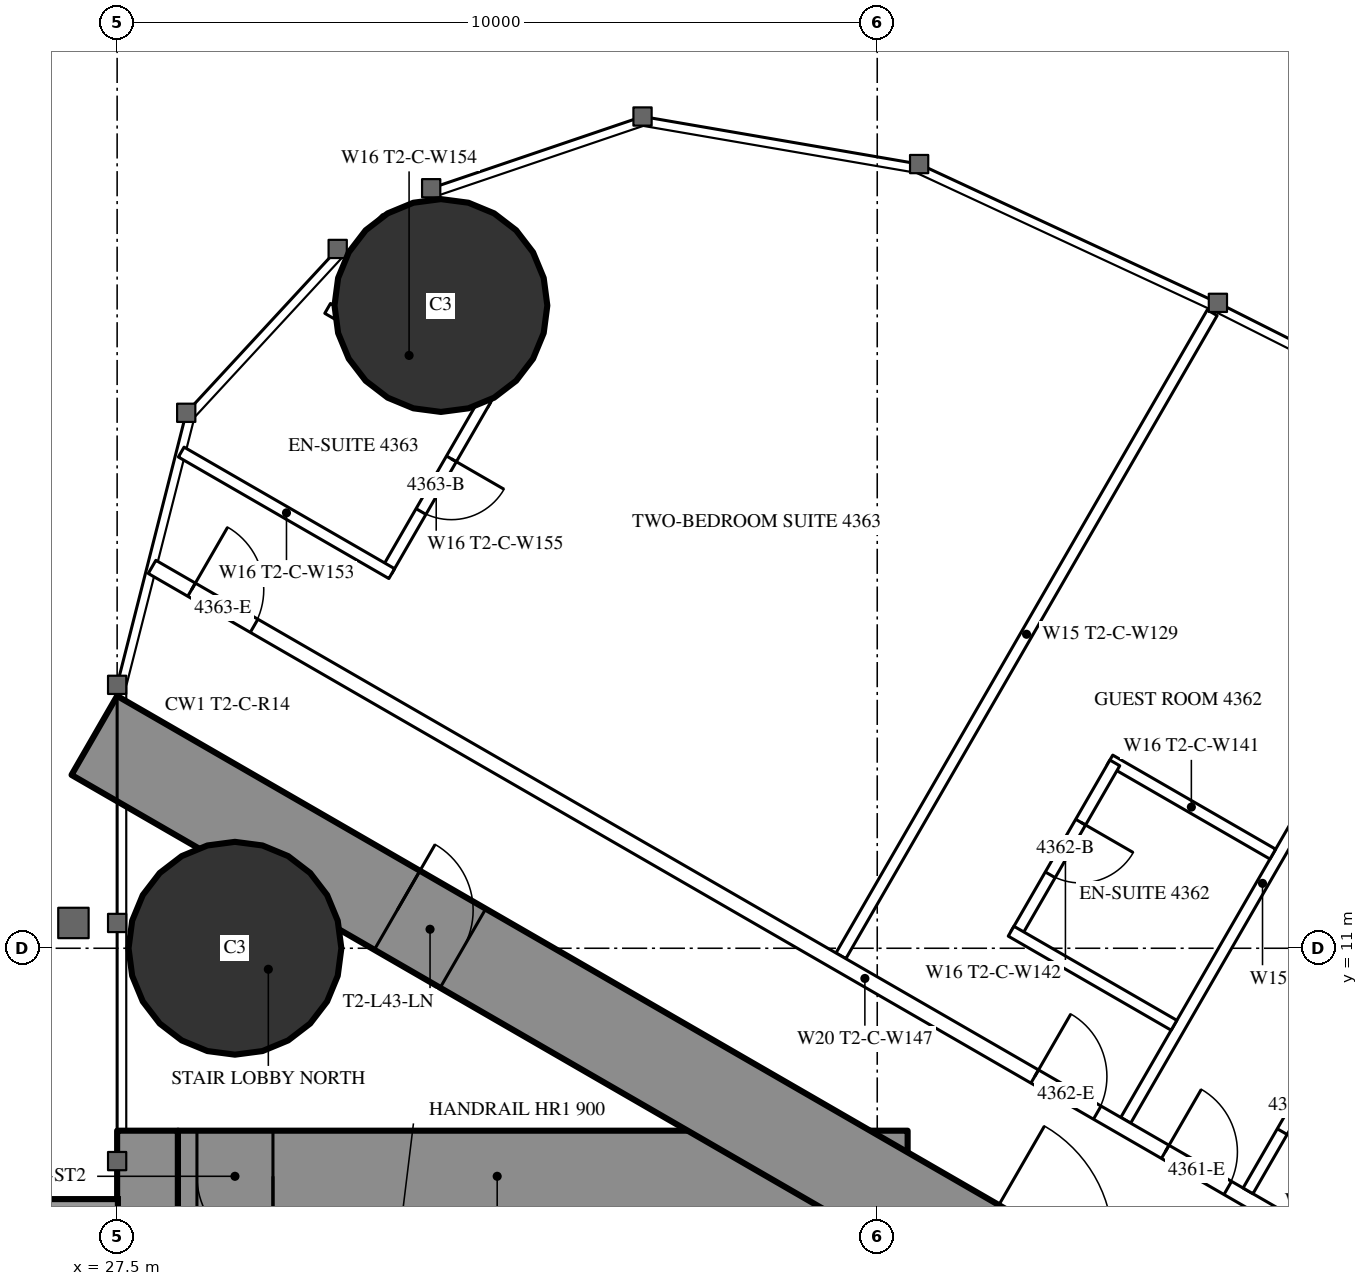
"""IFC4 building model, lengths in metres.
Left out: names, types, materials, properties, quantities, classifications, styles, units other than length and angle.
Written with IfcOpenShell. Run it as: python <this file> out.ifc"""

import sys

from ifc_helpers import new_model, si_unit, direction, frame, frame_2d, origin, origin_2d, place, context, subcontext, project, spatial, rectangle, circle, extrude, element, fill, save


model = new_model("IFC4")
c1 = context("Model", 3, precision=1e-05, world=origin(), true_north=direction((0.0, 1.0)))
c2 = subcontext(c1, "Body", "Model", "MODEL_VIEW")
j1 = project(units=[si_unit("LENGTHUNIT", "METRE"), si_unit("PLANEANGLEUNIT", "RADIAN")], contexts=[c1])
p1 = place(None, origin())
s1 = spatial("IfcSite", under=j1, at=p1, CompositionType="ELEMENT")
p2 = place(p1, origin())
s2 = spatial("IfcBuilding", under=s1, at=p2, CompositionType="ELEMENT")
p3 = place(p2, frame((0.0, 0.0, 163.3)))
s3 = spatial("IfcBuildingStorey", under=s2, at=p3, CompositionType="ELEMENT", Elevation=163.3)
for number, where, z_axis, x_axis in (
    (1, (31.76, 19.456, 0.0), (0.0, 0.0, 1.0), (1.0, 0.0, 0.0)),
    (2, (29.05, 11.0, 0.0), (0.0, 0.0, 1.0), (1.0, 0.0, 0.0)),
):
    element("IfcColumn", number, at=place(p3, frame(where, z_axis=z_axis, x_axis=x_axis)), inside=s3, PredefinedType="COLUMN", context=c2, shape_type="SweptSolid", body=[
        extrude(circle(Radius=1.4, at=origin_2d()), origin(), (0.0, 0.0, 1.0), 3.5),
    ])
p4 = place(p3, frame((27.9, -8.6, 0.0), z_axis=(0.0, 0.0, 1.0), x_axis=(0.0, 1.0, 0.0)))
e3 = element("IfcWall", 3, at=p4, inside=s3, PredefinedType="SHEAR", context=c2, shape_type="SweptSolid", body=[
    extrude(rectangle(XDim=17.2, YDim=0.8, at=frame_2d((8.6, 0.0))), origin(), (0.0, 0.0, 1.0), 3.5),
])
p5 = place(p4, frame((2.45, 0.0, 0.6)))
e4 = element("IfcOpeningElement", 4, at=p5, cuts=e3, PredefinedType="OPENING", context=c2, shape_type="SweptSolid", body=[
    extrude(rectangle(XDim=0.6, YDim=2.1, at=frame_2d((0.3, 1.05))), frame((0.0, 0.41, 0.0), z_axis=(0.0, -1.0, 0.0), x_axis=(1.0, 0.0, 0.0)), (0.0, 0.0, 1.0), 0.82),
])
p6 = place(p4, frame((14.15, 0.0, 0.6)))
e5 = element("IfcOpeningElement", 5, at=p6, cuts=e3, PredefinedType="OPENING", context=c2, shape_type="SweptSolid", body=[
    extrude(rectangle(XDim=0.6, YDim=2.1, at=frame_2d((0.3, 1.05))), frame((0.0, 0.41, 0.0), z_axis=(0.0, -1.0, 0.0), x_axis=(1.0, 0.0, 0.0)), (0.0, 0.0, 1.0), 0.82),
])
p7 = place(p3, frame((37.3, -8.6, 0.0), z_axis=(0.0, 0.0, 1.0), x_axis=(0.0, 1.0, 0.0)))
e6 = element("IfcWall", 6, at=p7, inside=s3, PredefinedType="SHEAR", context=c2, shape_type="SweptSolid", body=[
    extrude(rectangle(XDim=17.2, YDim=1.2, at=frame_2d((8.6, 0.0))), origin(), (0.0, 0.0, 1.0), 3.5),
])
p8 = place(p7, frame((7.7, 0.0, 0.0)))
e7 = element("IfcOpeningElement", 7, at=p8, cuts=e6, PredefinedType="OPENING", context=c2, shape_type="SweptSolid", body=[
    extrude(rectangle(XDim=1.8, YDim=2.2, at=frame_2d((0.9, 1.1))), frame((0.0, 0.61, 0.0), z_axis=(0.0, -1.0, 0.0), x_axis=(1.0, 0.0, 0.0)), (0.0, 0.0, 1.0), 1.22),
])
p9 = place(p3, frame((28.3, 8.0, 0.0), z_axis=(0.0, 0.0, 1.0), x_axis=(1.0, 0.0, 0.0)))
e8 = element("IfcWall", 8, at=p9, inside=s3, PredefinedType="SHEAR", context=c2, shape_type="SweptSolid", body=[
    extrude(rectangle(XDim=8.4, YDim=1.2, at=frame_2d((4.2, 0.0))), origin(), (0.0, 0.0, 1.0), 3.5),
])
p10 = place(p9, frame((0.25, 0.0, 0.0)))
e9 = element("IfcOpeningElement", 9, at=p10, cuts=e8, PredefinedType="OPENING", context=c2, shape_type="SweptSolid", body=[
    extrude(rectangle(XDim=1.0, YDim=2.2, at=frame_2d((0.5, 1.1))), frame((0.0, 0.61, 0.0), z_axis=(0.0, -1.0, 0.0), x_axis=(1.0, 0.0, 0.0)), (0.0, 0.0, 1.0), 1.22),
])
p11 = place(p3, frame((27.2, 13.8, 0.0), z_axis=(0.0, 0.0, 1.0), x_axis=(0.866024515034, -0.500001539357, 0.0)))
e10 = element("IfcWall", 10, at=p11, inside=s3, PredefinedType="SHEAR", context=c2, shape_type="SweptSolid", body=[
    extrude(rectangle(XDim=26.907, YDim=1.2, at=frame_2d((13.454, 0.0))), origin(), (0.0, 0.0, 1.0), 3.5),
])
p12 = place(p11, frame((4.6, 0.0, 0.0)))
e11 = element("IfcOpeningElement", 11, at=p12, cuts=e10, PredefinedType="OPENING", context=c2, shape_type="SweptSolid", body=[
    extrude(rectangle(XDim=1.0, YDim=2.2, at=frame_2d((0.5, 1.1))), frame((0.0, 0.61, 0.0), z_axis=(0.0, -1.0, 0.0), x_axis=(1.0, 0.0, 0.0)), (0.0, 0.0, 1.0), 1.22),
])
p13 = place(p11, frame((13.395, 0.0, 0.0)))
e12 = element("IfcOpeningElement", 12, at=p13, cuts=e10, PredefinedType="OPENING", context=c2, shape_type="SweptSolid", body=[
    extrude(rectangle(XDim=1.8, YDim=2.2, at=frame_2d((0.9, 1.1))), frame((0.0, 0.61, 0.0), z_axis=(0.0, -1.0, 0.0), x_axis=(1.0, 0.0, 0.0)), (0.0, 0.0, 1.0), 1.22),
])
p14 = place(p3, frame((37.022, 10.9, 0.0), z_axis=(0.0, 0.0, 1.0), x_axis=(0.499998620953, 0.866026199976, 0.0)))
e13 = element("IfcWall", 13, at=p14, inside=s3, PredefinedType="PARTITIONING", context=c2, shape_type="SweptSolid", body=[
    extrude(rectangle(XDim=9.77, YDim=0.15, at=frame_2d((4.885, 0.0))), origin(), (0.0, 0.0, 1.0), 3.25),
])
p15 = place(p3, frame((40.769, 8.737, 0.0), z_axis=(0.0, 0.0, 1.0), x_axis=(0.500013115284, 0.866017831539, 0.0)))
e14 = element("IfcWall", 14, at=p15, inside=s3, PredefinedType="PARTITIONING", context=c2, shape_type="SweptSolid", body=[
    extrude(rectangle(XDim=7.198, YDim=0.15, at=frame_2d((3.599, 0.0))), origin(), (0.0, 0.0, 1.0), 2.3),
])
p16 = place(p3, frame((27.959, 16.017, 0.0), z_axis=(0.0, 0.0, 1.0), x_axis=(0.866027146794, -0.499996981007, 0.0)))
e15 = element("IfcWall", 15, at=p16, inside=s3, PredefinedType="PARTITIONING", context=c2, shape_type="SweptSolid", body=[
    extrude(rectangle(XDim=21.657, YDim=0.2, at=frame_2d((10.829, 0.0))), origin(), (0.0, 0.0, 1.0), 3.25),
])
p17 = place(p16, frame((15.391, 0.0, 0.0)))
e16 = element("IfcOpeningElement", 16, at=p17, cuts=e15, PredefinedType="OPENING", context=c2, shape_type="SweptSolid", body=[
    extrude(rectangle(XDim=0.95, YDim=2.2, at=frame_2d((0.475, 1.1))), frame((0.0, 0.11, 0.0), z_axis=(0.0, -1.0, 0.0), x_axis=(1.0, 0.0, 0.0)), (0.0, 0.0, 1.0), 0.22),
])
p18 = place(p16, frame((13.409, 0.0, 0.0)))
e17 = element("IfcOpeningElement", 17, at=p18, cuts=e15, PredefinedType="OPENING", context=c2, shape_type="SweptSolid", body=[
    extrude(rectangle(XDim=0.95, YDim=2.2, at=frame_2d((0.475, 1.1))), frame((0.0, 0.11, 0.0), z_axis=(0.0, -1.0, 0.0), x_axis=(1.0, 0.0, 0.0)), (0.0, 0.0, 1.0), 0.22),
])
p19 = place(p16, frame((0.6, 0.0, 0.0)))
e18 = element("IfcOpeningElement", 18, at=p19, cuts=e15, PredefinedType="OPENING", context=c2, shape_type="SweptSolid", body=[
    extrude(rectangle(XDim=0.95, YDim=2.2, at=frame_2d((0.475, 1.1))), frame((0.0, 0.11, 0.0), z_axis=(0.0, -1.0, 0.0), x_axis=(1.0, 0.0, 0.0)), (0.0, 0.0, 1.0), 0.22),
])
p20 = place(p16, frame((19.349, 0.0, 0.0)))
e19 = element("IfcOpeningElement", 19, at=p20, cuts=e15, PredefinedType="OPENING", context=c2, shape_type="SweptSolid", body=[
    extrude(rectangle(XDim=1.8, YDim=2.2, at=frame_2d((0.9, 1.1))), frame((0.0, 0.11, 0.0), z_axis=(0.0, -1.0, 0.0), x_axis=(1.0, 0.0, 0.0)), (0.0, 0.0, 1.0), 0.22),
])
p21 = place(p3, frame((42.378, 7.808, 0.0), z_axis=(0.0, 0.0, 1.0), x_axis=(0.500006934395, 0.866021400173, 0.0)))
e20 = element("IfcWall", 20, at=p21, inside=s3, PredefinedType="PARTITIONING", context=c2, shape_type="SweptSolid", body=[
    extrude(rectangle(XDim=2.6, YDim=0.15, at=frame_2d((1.3, 0.0))), origin(), (0.0, 0.0, 1.0), 3.25),
])
p22 = place(p21, frame((0.9, 0.0, 0.0)))
e21 = element("IfcOpeningElement", 21, at=p22, cuts=e20, PredefinedType="OPENING", context=c2, shape_type="SweptSolid", body=[
    extrude(rectangle(XDim=0.8, YDim=2.2, at=frame_2d((0.4, 1.1))), frame((0.0, 0.085, 0.0), z_axis=(0.0, -1.0, 0.0), x_axis=(1.0, 0.0, 0.0)), (0.0, 0.0, 1.0), 0.17),
])
p23 = place(p3, frame((40.561, 13.476, 0.0), z_axis=(0.0, 0.0, 1.0), x_axis=(0.866006523861, -0.500032699561, 0.0)))
e22 = element("IfcWall", 22, at=p23, inside=s3, PredefinedType="PARTITIONING", context=c2, shape_type="SweptSolid", body=[
    extrude(rectangle(XDim=2.475, YDim=0.15, at=frame_2d((1.237, 0.0))), origin(), (0.0, 0.0, 1.0), 3.25),
])
p24 = place(p3, frame((39.326, 11.187, 0.0), z_axis=(0.0, 0.0, 1.0), x_axis=(0.500047596559, 0.865997922154, 0.0)))
e23 = element("IfcWall", 23, at=p24, inside=s3, PredefinedType="PARTITIONING", context=c2, shape_type="SweptSolid", body=[
    extrude(rectangle(XDim=2.6, YDim=0.15, at=frame_2d((1.3, 0.0))), origin(), (0.0, 0.0, 1.0), 3.25),
])
p25 = place(p24, frame((0.9, 0.0, 0.0)))
e24 = element("IfcOpeningElement", 24, at=p25, cuts=e23, PredefinedType="OPENING", context=c2, shape_type="SweptSolid", body=[
    extrude(rectangle(XDim=0.8, YDim=2.2, at=frame_2d((0.4, 1.1))), frame((0.0, 0.085, 0.0), z_axis=(0.0, -1.0, 0.0), x_axis=(1.0, 0.0, 0.0)), (0.0, 0.0, 1.0), 0.17),
])
for number, where, z_axis, x_axis in (
    (25, (39.261, 11.224, 0.0), (0.0, 0.0, 1.0), (0.866, -0.5, 0.0)),
    (26, (30.269, 19.418, 0.0), (0.0, 0.0, 1.0), (0.866, -0.5, 0.0)),
):
    element("IfcWall", number, at=place(p3, frame(where, z_axis=z_axis, x_axis=x_axis)), inside=s3, PredefinedType="PARTITIONING", context=c2, shape_type="SweptSolid", body=[
        extrude(rectangle(XDim=2.475, YDim=0.15, at=frame_2d((1.237, 0.0))), origin(), (0.0, 0.0, 1.0), 3.25),
    ])
p26 = place(p3, frame((31.048, 15.966, 0.0), z_axis=(0.0, 0.0, 1.0), x_axis=(0.499936506574, 0.866062058628, 0.0)))
e27 = element("IfcWall", 27, at=p26, inside=s3, PredefinedType="PARTITIONING", context=c2, shape_type="SweptSolid", body=[
    extrude(rectangle(XDim=2.6, YDim=0.15, at=frame_2d((1.3, 0.0))), origin(), (0.0, 0.0, 1.0), 2.3),
])
p27 = place(p26, frame((0.9, 0.0, 0.0)))
e28 = element("IfcOpeningElement", 28, at=p27, cuts=e27, PredefinedType="OPENING", context=c2, shape_type="SweptSolid", body=[
    extrude(rectangle(XDim=0.8, YDim=2.2, at=frame_2d((0.4, 1.1))), frame((0.0, 0.085, 0.0), z_axis=(0.0, -1.0, 0.0), x_axis=(1.0, 0.0, 0.0)), (0.0, 0.0, 1.0), 0.17),
])
p28 = place(p3, frame((28.343, 17.528, 0.0), z_axis=(0.0, 0.0, 1.0), x_axis=(0.86600760081, -0.500030834389, 0.0)))
e29 = element("IfcWall", 29, at=p28, inside=s3, PredefinedType="PARTITIONING", context=c2, shape_type="SweptSolid", body=[
    extrude(rectangle(XDim=3.198, YDim=0.15, at=frame_2d((1.599, 0.0))), origin(), (0.0, 0.0, 1.0), 3.25),
])
p29 = place(p22, origin())
e30 = element("IfcDoor", 30, at=p29, inside=s3, OperationType="SINGLE_SWING_RIGHT", PredefinedType="DOOR", context=c2, shape_type="SweptSolid", body=[
    extrude(rectangle(XDim=0.8, YDim=2.2, at=frame_2d((0.4, 1.1))), frame((0.0, 0.025, 0.0), z_axis=(0.0, -1.0, 0.0), x_axis=(1.0, 0.0, 0.0)), (0.0, 0.0, 1.0), 0.05),
])
fill(e21, e30)
p30 = place(p17, origin())
e31 = element("IfcDoor", 31, at=p30, inside=s3, OperationType="SINGLE_SWING_LEFT", PredefinedType="DOOR", context=c2, shape_type="SweptSolid", body=[
    extrude(rectangle(XDim=0.95, YDim=2.2, at=frame_2d((0.475, 1.1))), frame((0.0, 0.025, 0.0), z_axis=(0.0, -1.0, 0.0), x_axis=(1.0, 0.0, 0.0)), (0.0, 0.0, 1.0), 0.05),
])
fill(e16, e31)
p31 = place(p25, origin())
e32 = element("IfcDoor", 32, at=p31, inside=s3, OperationType="SINGLE_SWING_RIGHT", PredefinedType="DOOR", context=c2, shape_type="SweptSolid", body=[
    extrude(rectangle(XDim=0.8, YDim=2.2, at=frame_2d((0.4, 1.1))), frame((0.0, 0.025, 0.0), z_axis=(0.0, -1.0, 0.0), x_axis=(1.0, 0.0, 0.0)), (0.0, 0.0, 1.0), 0.05),
])
fill(e24, e32)
p32 = place(p18, origin())
e33 = element("IfcDoor", 33, at=p32, inside=s3, OperationType="SINGLE_SWING_LEFT", PredefinedType="DOOR", context=c2, shape_type="SweptSolid", body=[
    extrude(rectangle(XDim=0.95, YDim=2.2, at=frame_2d((0.475, 1.1))), frame((0.0, 0.025, 0.0), z_axis=(0.0, -1.0, 0.0), x_axis=(1.0, 0.0, 0.0)), (0.0, 0.0, 1.0), 0.05),
])
fill(e17, e33)
p33 = place(p27, origin())
e34 = element("IfcDoor", 34, at=p33, inside=s3, OperationType="SINGLE_SWING_RIGHT", PredefinedType="DOOR", context=c2, shape_type="SweptSolid", body=[
    extrude(rectangle(XDim=0.8, YDim=2.2, at=frame_2d((0.4, 1.1))), frame((0.0, 0.025, 0.0), z_axis=(0.0, -1.0, 0.0), x_axis=(1.0, 0.0, 0.0)), (0.0, 0.0, 1.0), 0.05),
])
fill(e28, e34)
p34 = place(p19, origin())
e35 = element("IfcDoor", 35, at=p34, inside=s3, OperationType="SINGLE_SWING_LEFT", PredefinedType="DOOR", context=c2, shape_type="SweptSolid", body=[
    extrude(rectangle(XDim=0.95, YDim=2.2, at=frame_2d((0.475, 1.1))), frame((0.0, 0.025, 0.0), z_axis=(0.0, -1.0, 0.0), x_axis=(1.0, 0.0, 0.0)), (0.0, 0.0, 1.0), 0.05),
])
fill(e18, e35)
p35 = place(p12, origin())
e36 = element("IfcDoor", 36, at=p35, inside=s3, OperationType="SINGLE_SWING_LEFT", PredefinedType="DOOR", context=c2, shape_type="SweptSolid", body=[
    extrude(rectangle(XDim=1.0, YDim=2.2, at=frame_2d((0.5, 1.1))), frame((0.0, 0.025, 0.0), z_axis=(0.0, -1.0, 0.0), x_axis=(1.0, 0.0, 0.0)), (0.0, 0.0, 1.0), 0.05),
])
fill(e11, e36)
p36 = place(p10, origin())
e37 = element("IfcDoor", 37, at=p36, inside=s3, OperationType="SINGLE_SWING_RIGHT", PredefinedType="DOOR", context=c2, shape_type="SweptSolid", body=[
    extrude(rectangle(XDim=1.0, YDim=2.2, at=frame_2d((0.5, 1.1))), frame((0.0, 0.025, 0.0), z_axis=(0.0, -1.0, 0.0), x_axis=(1.0, 0.0, 0.0)), (0.0, 0.0, 1.0), 0.05),
])
fill(e9, e37)
save(model, sys.argv[1])
